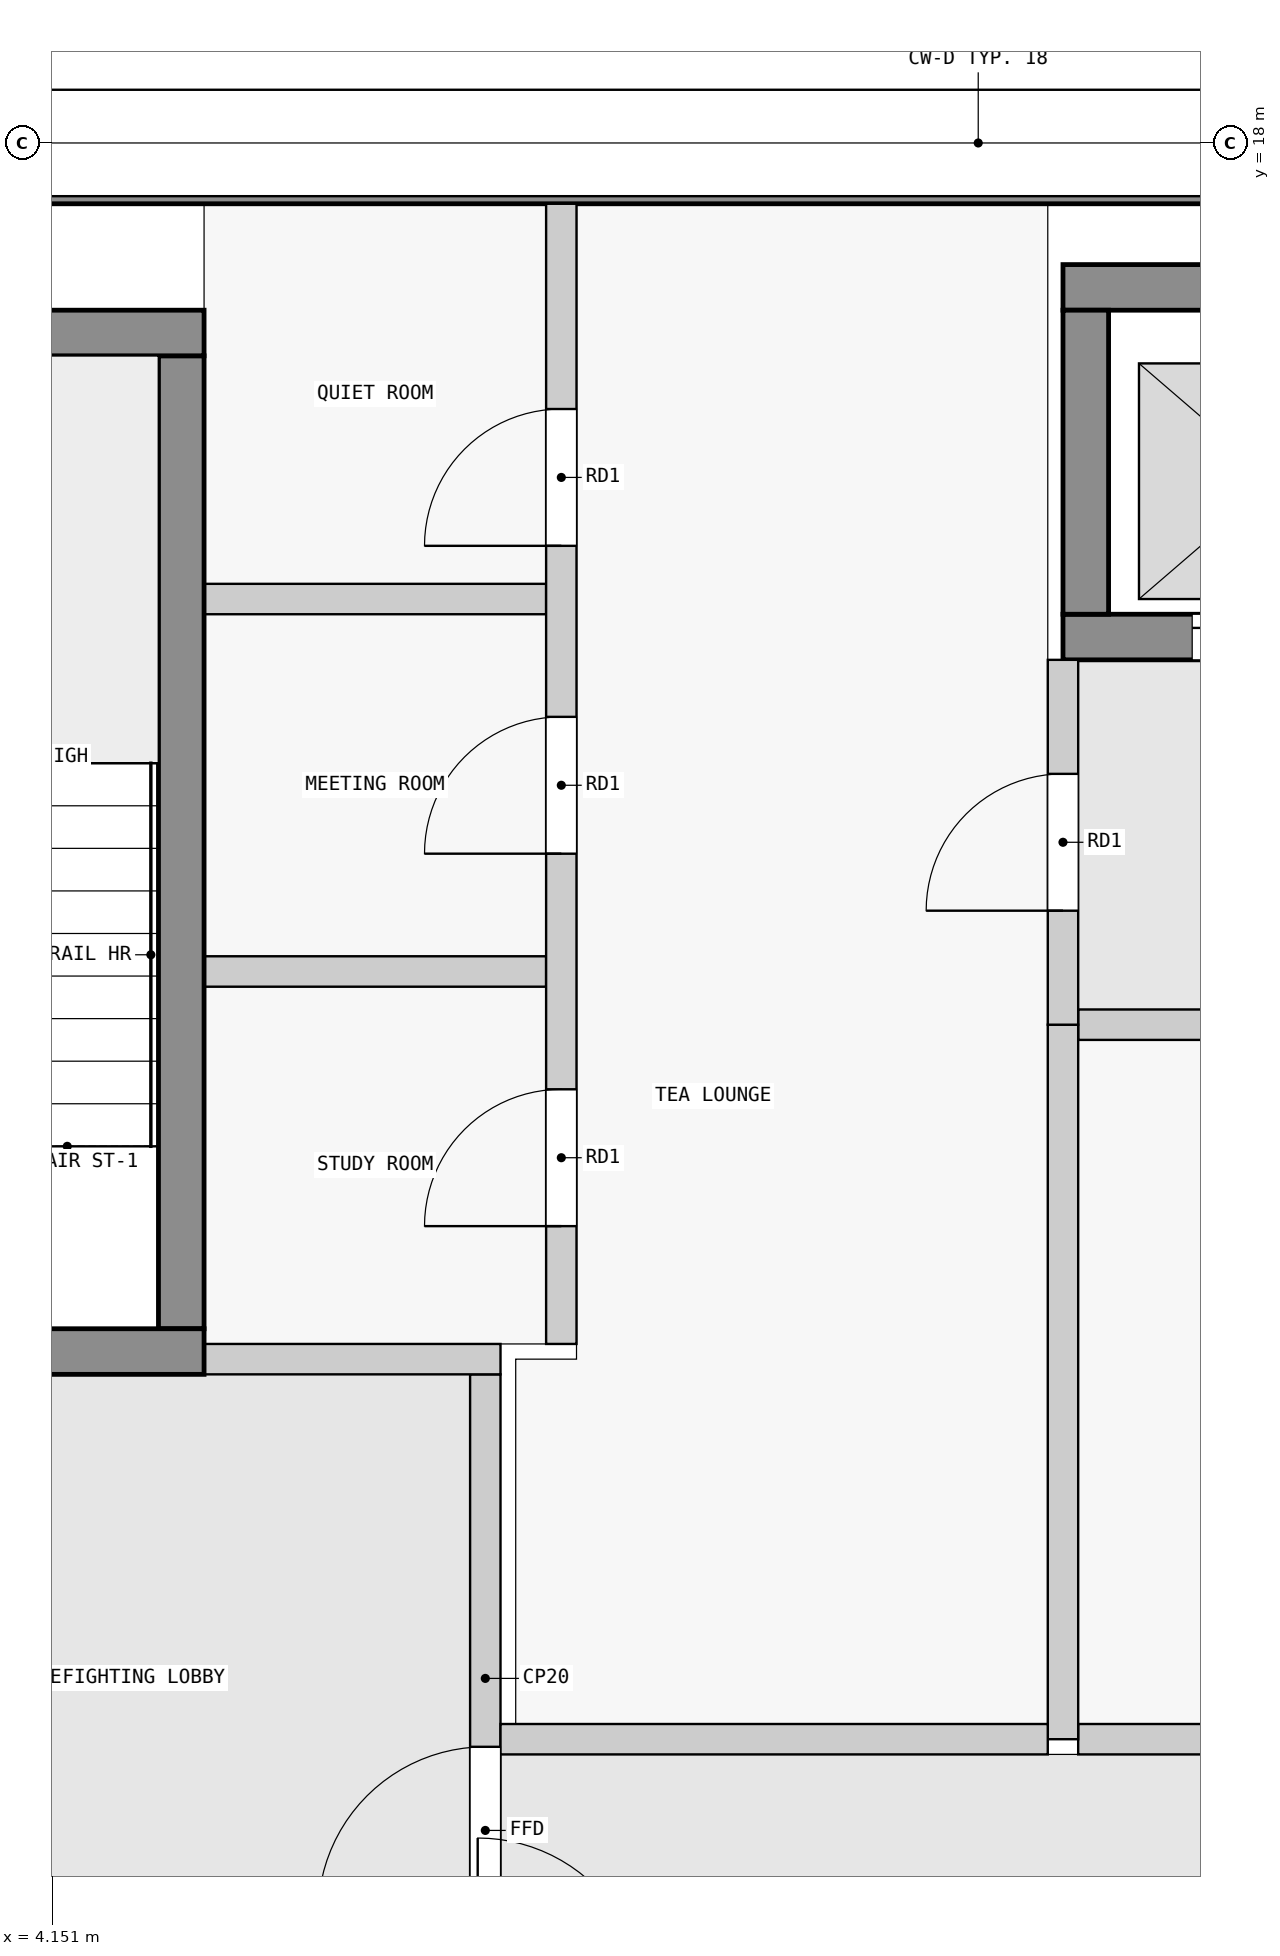
"""IFC4 building model, lengths in metres.
Left out: names, types, materials, properties, quantities, classifications, styles, units other than length and angle.
Written with IfcOpenShell. Run it as: python <this file> out.ifc"""

import sys

from ifc_helpers import new_model, si_unit, direction, frame, frame_2d, origin, place, context, subcontext, project, spatial, rectangle, extrude, element, fill, save


model = new_model("IFC4")
c1 = context("Model", 3, precision=1e-05, world=origin(), true_north=direction((0.0, 1.0)))
c2 = subcontext(c1, "Body", "Model", "MODEL_VIEW")
j1 = project(units=[si_unit("LENGTHUNIT", "METRE"), si_unit("PLANEANGLEUNIT", "RADIAN")], contexts=[c1])
p1 = place(None, origin())
s1 = spatial("IfcSite", under=j1, at=p1, CompositionType="ELEMENT")
p2 = place(p1, origin())
s2 = spatial("IfcBuilding", under=s1, at=p2, CompositionType="ELEMENT")
p3 = place(p2, frame((0.0, 0.0, 301.9)))
s3 = spatial("IfcBuildingStorey", under=s2, at=p3, CompositionType="ELEMENT", Elevation=301.9)
p4 = place(p3, frame((1.9, 17.8, 0.0), z_axis=(0.0, 0.0, 1.0), x_axis=(1.0, 0.0, 0.0)))
e1 = element("IfcWall", 1, at=p4, inside=s3, PredefinedType="SHEAR", context=c2, shape_type="SweptSolid", body=[
    extrude(rectangle(XDim=20.6, YDim=0.4, at=frame_2d((10.3, 0.0))), origin(), (0.0, 0.0, 1.0), 3.25),
])
p5 = place(p3, frame((2.3, 10.05, 0.0), z_axis=(0.0, 0.0, 1.0), x_axis=(1.0, 0.0, 0.0)))
e2 = element("IfcWall", 2, at=p5, inside=s3, PredefinedType="SHEAR", context=c2, shape_type="SweptSolid", body=[
    extrude(rectangle(XDim=2.85, YDim=0.3, at=frame_2d((1.425, 0.0))), origin(), (0.0, 0.0, 1.0), 3.25),
])
p6 = place(p5, frame((0.25, 0.0, 0.0)))
e3 = element("IfcOpeningElement", 3, at=p6, cuts=e2, PredefinedType="OPENING", context=c2, shape_type="SweptSolid", body=[
    extrude(rectangle(XDim=1.1, YDim=2.1, at=frame_2d((0.55, 1.05))), frame((0.0, 0.16, 0.0), z_axis=(0.0, -1.0, 0.0), x_axis=(1.0, 0.0, 0.0)), (0.0, 0.0, 1.0), 0.32),
])
p7 = place(p3, frame((5.0, 10.2, 0.0), z_axis=(0.0, 0.0, 1.0), x_axis=(0.0, 1.0, 0.0)))
e4 = element("IfcWall", 4, at=p7, inside=s3, PredefinedType="SHEAR", context=c2, shape_type="SweptSolid", body=[
    extrude(rectangle(XDim=6.4, YDim=0.3, at=frame_2d((3.2, 0.0))), origin(), (0.0, 0.0, 1.0), 3.25),
])
p8 = place(p3, frame((2.3, 16.75, 0.0), z_axis=(0.0, 0.0, 1.0), x_axis=(1.0, 0.0, 0.0)))
e5 = element("IfcWall", 5, at=p8, inside=s3, PredefinedType="SHEAR", context=c2, shape_type="SweptSolid", body=[
    extrude(rectangle(XDim=2.85, YDim=0.3, at=frame_2d((1.425, 0.0))), origin(), (0.0, 0.0, 1.0), 3.25),
])
p9 = place(p3, frame((10.8, 17.05, 0.0), z_axis=(0.0, 0.0, 1.0), x_axis=(1.0, 0.0, 0.0)))
e6 = element("IfcWall", 6, at=p9, inside=s3, PredefinedType="SHEAR", context=c2, shape_type="SweptSolid", body=[
    extrude(rectangle(XDim=7.8, YDim=0.3, at=frame_2d((3.9, 0.0))), origin(), (0.0, 0.0, 1.0), 3.25),
])
p10 = place(p3, frame((10.8, 14.75, 0.0), z_axis=(0.0, 0.0, 1.0), x_axis=(1.0, 0.0, 0.0)))
e7 = element("IfcWall", 7, at=p10, inside=s3, PredefinedType="SHEAR", context=c2, shape_type="SweptSolid", body=[
    extrude(rectangle(XDim=7.8, YDim=0.3, at=frame_2d((3.9, 0.0))), origin(), (0.0, 0.0, 1.0), 3.25),
])
p11 = place(p10, frame((0.85, 0.0, 0.0)))
e8 = element("IfcOpeningElement", 8, at=p11, cuts=e7, PredefinedType="OPENING", context=c2, shape_type="SweptSolid", body=[
    extrude(rectangle(XDim=1.1, YDim=2.1, at=frame_2d((0.55, 1.05))), frame((0.0, 0.16, 0.0), z_axis=(0.0, -1.0, 0.0), x_axis=(1.0, 0.0, 0.0)), (0.0, 0.0, 1.0), 0.32),
])
p12 = place(p10, frame((3.35, 0.0, 0.0)))
e9 = element("IfcOpeningElement", 9, at=p12, cuts=e7, PredefinedType="OPENING", context=c2, shape_type="SweptSolid", body=[
    extrude(rectangle(XDim=1.1, YDim=2.1, at=frame_2d((0.55, 1.05))), frame((0.0, 0.16, 0.0), z_axis=(0.0, -1.0, 0.0), x_axis=(1.0, 0.0, 0.0)), (0.0, 0.0, 1.0), 0.32),
])
p13 = place(p10, frame((5.85, 0.0, 0.0)))
e10 = element("IfcOpeningElement", 10, at=p13, cuts=e7, PredefinedType="OPENING", context=c2, shape_type="SweptSolid", body=[
    extrude(rectangle(XDim=1.1, YDim=2.1, at=frame_2d((0.55, 1.05))), frame((0.0, 0.16, 0.0), z_axis=(0.0, -1.0, 0.0), x_axis=(1.0, 0.0, 0.0)), (0.0, 0.0, 1.0), 0.32),
])
p14 = place(p3, frame((10.95, 14.9, 0.0), z_axis=(0.0, 0.0, 1.0), x_axis=(0.0, 1.0, 0.0)))
e11 = element("IfcWall", 11, at=p14, inside=s3, PredefinedType="SHEAR", context=c2, shape_type="SweptSolid", body=[
    extrude(rectangle(XDim=2.0, YDim=0.3, at=frame_2d((1.0, 0.0))), origin(), (0.0, 0.0, 1.0), 3.25),
])
p15 = place(p3, frame((7.0, 5.9, 0.0), z_axis=(0.0, 0.0, 1.0), x_axis=(0.0, 1.0, 0.0)))
e12 = element("IfcWall", 12, at=p15, inside=s3, PredefinedType="PARTITIONING", context=c2, shape_type="SweptSolid", body=[
    extrude(rectangle(XDim=4.0, YDim=0.2, at=frame_2d((2.0, 0.0))), origin(), (0.0, 0.0, 1.0), 3.25),
])
p16 = place(p15, frame((0.45, 0.0, 0.0)))
e13 = element("IfcOpeningElement", 13, at=p16, cuts=e12, PredefinedType="OPENING", context=c2, shape_type="SweptSolid", body=[
    extrude(rectangle(XDim=1.1, YDim=2.1, at=frame_2d((0.55, 1.05))), frame((0.0, 0.11, 0.0), z_axis=(0.0, -1.0, 0.0), x_axis=(1.0, 0.0, 0.0)), (0.0, 0.0, 1.0), 0.22),
])
p17 = place(p3, frame((5.15, 10.0, 0.0), z_axis=(0.0, 0.0, 1.0), x_axis=(1.0, 0.0, 0.0)))
e14 = element("IfcWall", 14, at=p17, inside=s3, PredefinedType="PARTITIONING", context=c2, shape_type="SweptSolid", body=[
    extrude(rectangle(XDim=1.95, YDim=0.2, at=frame_2d((0.975, 0.0))), origin(), (0.0, 0.0, 1.0), 3.25),
])
p18 = place(p3, frame((7.1, 7.5, 0.0), z_axis=(0.0, 0.0, 1.0), x_axis=(1.0, 0.0, 0.0)))
e15 = element("IfcWall", 15, at=p18, inside=s3, PredefinedType="PARTITIONING", context=c2, shape_type="SweptSolid", body=[
    extrude(rectangle(XDim=3.6, YDim=0.2, at=frame_2d((1.8, 0.0))), origin(), (0.0, 0.0, 1.0), 3.25),
])
p19 = place(p3, frame((10.8, 12.2, 0.0), z_axis=(0.0, 0.0, 1.0), x_axis=(0.0, 1.0, 0.0)))
e16 = element("IfcWall", 16, at=p19, inside=s3, PredefinedType="PARTITIONING", context=c2, shape_type="SweptSolid", body=[
    extrude(rectangle(XDim=2.4, YDim=0.2, at=frame_2d((1.2, 0.0))), origin(), (0.0, 0.0, 1.0), 3.25),
])
p20 = place(p19, frame((0.75, 0.0, 0.0)))
e17 = element("IfcOpeningElement", 17, at=p20, cuts=e16, PredefinedType="OPENING", context=c2, shape_type="SweptSolid", body=[
    extrude(rectangle(XDim=0.9, YDim=2.1, at=frame_2d((0.45, 1.05))), frame((0.0, 0.11, 0.0), z_axis=(0.0, -1.0, 0.0), x_axis=(1.0, 0.0, 0.0)), (0.0, 0.0, 1.0), 0.22),
])
p21 = place(p3, frame((10.8, 7.5, 0.0), z_axis=(0.0, 0.0, 1.0), x_axis=(0.0, 1.0, 0.0)))
e18 = element("IfcWall", 18, at=p21, inside=s3, PredefinedType="PARTITIONING", context=c2, shape_type="SweptSolid", body=[
    extrude(rectangle(XDim=4.7, YDim=0.2, at=frame_2d((2.35, 0.0))), origin(), (0.0, 0.0, 1.0), 3.25),
])
p22 = place(p3, frame((10.9, 7.5, 0.0), z_axis=(0.0, 0.0, 1.0), x_axis=(1.0, 0.0, 0.0)))
e19 = element("IfcWall", 19, at=p22, inside=s3, PredefinedType="PARTITIONING", context=c2, shape_type="SweptSolid", body=[
    extrude(rectangle(XDim=8.7, YDim=0.2, at=frame_2d((4.35, 0.0))), origin(), (0.0, 0.0, 1.0), 3.25),
])
p23 = place(p3, frame((10.9, 12.2, 0.0), z_axis=(0.0, 0.0, 1.0), x_axis=(1.0, 0.0, 0.0)))
e20 = element("IfcWall", 20, at=p23, inside=s3, PredefinedType="PARTITIONING", context=c2, shape_type="SweptSolid", body=[
    extrude(rectangle(XDim=8.7, YDim=0.2, at=frame_2d((4.35, 0.0))), origin(), (0.0, 0.0, 1.0), 3.25),
])
p24 = place(p23, frame((3.9, 0.0, 0.0)))
e21 = element("IfcOpeningElement", 21, at=p24, cuts=e20, PredefinedType="OPENING", context=c2, shape_type="SweptSolid", body=[
    extrude(rectangle(XDim=0.9, YDim=2.1, at=frame_2d((0.45, 1.05))), frame((0.0, 0.11, 0.0), z_axis=(0.0, -1.0, 0.0), x_axis=(1.0, 0.0, 0.0)), (0.0, 0.0, 1.0), 0.22),
])
p25 = place(p3, frame((7.5, 10.1, 0.0), z_axis=(0.0, 0.0, 1.0), x_axis=(0.0, 1.0, 0.0)))
e22 = element("IfcWall", 22, at=p25, inside=s3, PredefinedType="PARTITIONING", context=c2, shape_type="SweptSolid", body=[
    extrude(rectangle(XDim=7.5, YDim=0.2, at=frame_2d((3.75, 0.0))), origin(), (0.0, 0.0, 1.0), 3.25),
])
p26 = place(p25, frame((0.775, 0.0, 0.0)))
e23 = element("IfcOpeningElement", 23, at=p26, cuts=e22, PredefinedType="OPENING", context=c2, shape_type="SweptSolid", body=[
    extrude(rectangle(XDim=0.9, YDim=2.1, at=frame_2d((0.45, 1.05))), frame((0.0, 0.11, 0.0), z_axis=(0.0, -1.0, 0.0), x_axis=(1.0, 0.0, 0.0)), (0.0, 0.0, 1.0), 0.22),
])
p27 = place(p25, frame((3.225, 0.0, 0.0)))
e24 = element("IfcOpeningElement", 24, at=p27, cuts=e22, PredefinedType="OPENING", context=c2, shape_type="SweptSolid", body=[
    extrude(rectangle(XDim=0.9, YDim=2.1, at=frame_2d((0.45, 1.05))), frame((0.0, 0.11, 0.0), z_axis=(0.0, -1.0, 0.0), x_axis=(1.0, 0.0, 0.0)), (0.0, 0.0, 1.0), 0.22),
])
p28 = place(p25, frame((5.25, 0.0, 0.0)))
e25 = element("IfcOpeningElement", 25, at=p28, cuts=e22, PredefinedType="OPENING", context=c2, shape_type="SweptSolid", body=[
    extrude(rectangle(XDim=0.9, YDim=2.1, at=frame_2d((0.45, 1.05))), frame((0.0, 0.11, 0.0), z_axis=(0.0, -1.0, 0.0), x_axis=(1.0, 0.0, 0.0)), (0.0, 0.0, 1.0), 0.22),
])
for number, where, z_axis, x_axis in (
    (26, (5.15, 12.55, 0.0), (0.0, 0.0, 1.0), (1.0, 0.0, 0.0)),
    (27, (5.15, 15.0, 0.0), (0.0, 0.0, 1.0), (1.0, 0.0, 0.0)),
):
    element("IfcWall", number, at=place(p3, frame(where, z_axis=z_axis, x_axis=x_axis)), inside=s3, PredefinedType="PARTITIONING", context=c2, shape_type="SweptSolid", body=[
        extrude(rectangle(XDim=2.25, YDim=0.2, at=frame_2d((1.125, 0.0))), origin(), (0.0, 0.0, 1.0), 3.25),
    ])
p29 = place(p16, origin())
e28 = element("IfcDoor", 28, at=p29, inside=s3, OperationType="SINGLE_SWING_LEFT", PredefinedType="DOOR", context=c2, shape_type="SweptSolid", body=[
    extrude(rectangle(XDim=1.1, YDim=2.1, at=frame_2d((0.55, 1.05))), frame((0.0, 0.025, 0.0), z_axis=(0.0, -1.0, 0.0), x_axis=(1.0, 0.0, 0.0)), (0.0, 0.0, 1.0), 0.05),
])
fill(e13, e28)
p30 = place(p20, origin())
e29 = element("IfcDoor", 29, at=p30, inside=s3, OperationType="SINGLE_SWING_LEFT", PredefinedType="DOOR", context=c2, shape_type="SweptSolid", body=[
    extrude(rectangle(XDim=0.9, YDim=2.1, at=frame_2d((0.45, 1.05))), frame((0.0, 0.025, 0.0), z_axis=(0.0, -1.0, 0.0), x_axis=(1.0, 0.0, 0.0)), (0.0, 0.0, 1.0), 0.05),
])
fill(e17, e29)
p31 = place(p11, origin())
e30 = element("IfcDoor", 30, at=p31, inside=s3, OperationType="DOUBLE_DOOR_SLIDING", PredefinedType="DOOR", context=c2, shape_type="SweptSolid", body=[
    extrude(rectangle(XDim=1.1, YDim=2.1, at=frame_2d((0.55, 1.05))), frame((0.0, 0.025, 0.0), z_axis=(0.0, -1.0, 0.0), x_axis=(1.0, 0.0, 0.0)), (0.0, 0.0, 1.0), 0.05),
])
fill(e8, e30)
p32 = place(p26, origin())
e31 = element("IfcDoor", 31, at=p32, inside=s3, OperationType="SINGLE_SWING_RIGHT", PredefinedType="DOOR", context=c2, shape_type="SweptSolid", body=[
    extrude(rectangle(XDim=0.9, YDim=2.1, at=frame_2d((0.45, 1.05))), frame((0.0, 0.025, 0.0), z_axis=(0.0, -1.0, 0.0), x_axis=(1.0, 0.0, 0.0)), (0.0, 0.0, 1.0), 0.05),
])
fill(e23, e31)
p33 = place(p27, origin())
e32 = element("IfcDoor", 32, at=p33, inside=s3, OperationType="SINGLE_SWING_RIGHT", PredefinedType="DOOR", context=c2, shape_type="SweptSolid", body=[
    extrude(rectangle(XDim=0.9, YDim=2.1, at=frame_2d((0.45, 1.05))), frame((0.0, 0.025, 0.0), z_axis=(0.0, -1.0, 0.0), x_axis=(1.0, 0.0, 0.0)), (0.0, 0.0, 1.0), 0.05),
])
fill(e24, e32)
p34 = place(p28, origin())
e33 = element("IfcDoor", 33, at=p34, inside=s3, OperationType="SINGLE_SWING_RIGHT", PredefinedType="DOOR", context=c2, shape_type="SweptSolid", body=[
    extrude(rectangle(XDim=0.9, YDim=2.1, at=frame_2d((0.45, 1.05))), frame((0.0, 0.025, 0.0), z_axis=(0.0, -1.0, 0.0), x_axis=(1.0, 0.0, 0.0)), (0.0, 0.0, 1.0), 0.05),
])
fill(e25, e33)
save(model, sys.argv[1])
